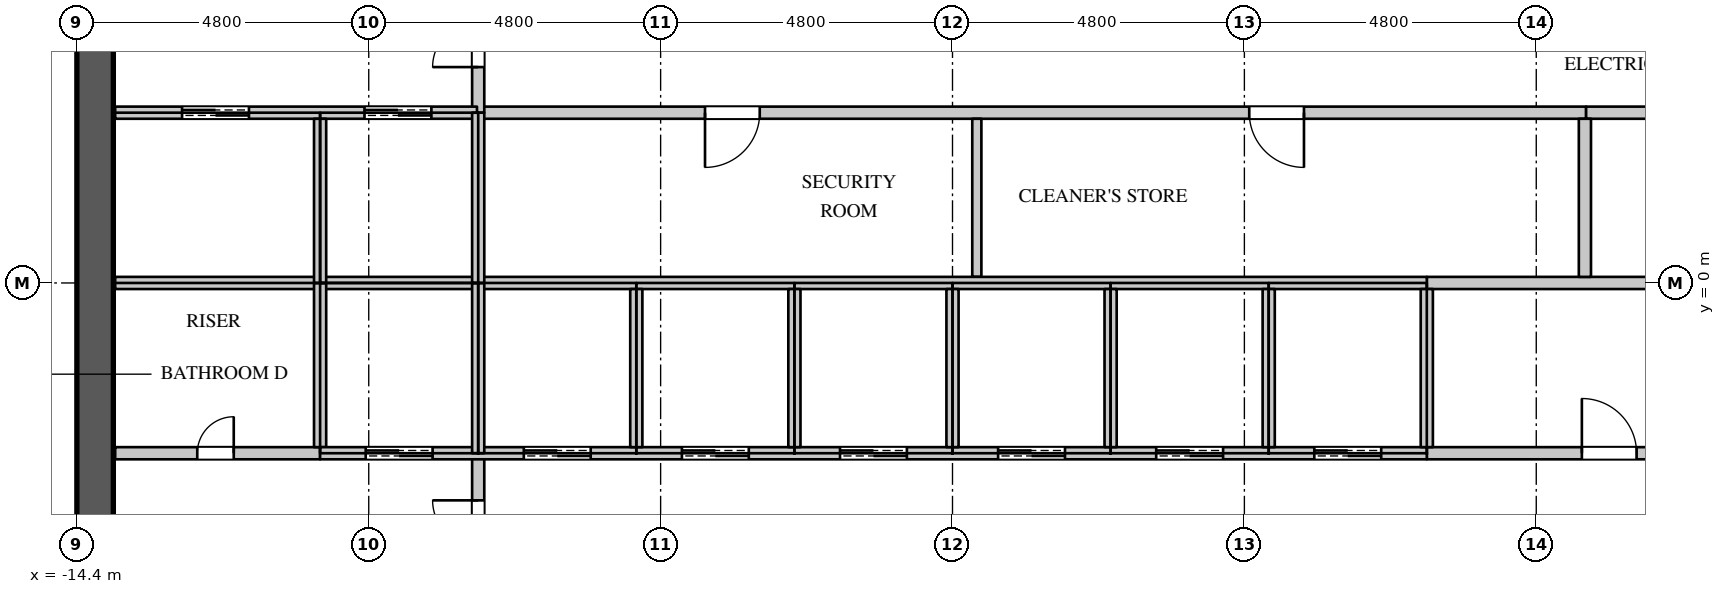
"""IFC4 building model, lengths in metres.
Left out: names, types, materials, properties, quantities, classifications, styles, units other than length and angle.
Written with IfcOpenShell. Run it as: python <this file> out.ifc"""

import sys

from ifc_helpers import new_model, si_unit, direction, frame, frame_2d, origin, place, context, subcontext, project, spatial, rectangle, extrude, element, fill, save


model = new_model("IFC4")
c1 = context("Model", 3, precision=1e-05, world=origin(), true_north=direction((0.0, 1.0)))
c2 = subcontext(c1, "Body", "Model", "MODEL_VIEW")
j1 = project(units=[si_unit("LENGTHUNIT", "METRE"), si_unit("PLANEANGLEUNIT", "RADIAN")], contexts=[c1])
p1 = place(None, origin())
s1 = spatial("IfcSite", under=j1, at=p1, CompositionType="ELEMENT")
p2 = place(p1, origin())
s2 = spatial("IfcBuilding", under=s1, at=p2, CompositionType="ELEMENT")
p3 = place(p2, frame((0.0, 0.0, 281.1)))
s3 = spatial("IfcBuildingStorey", under=s2, at=p3, CompositionType="ELEMENT", Elevation=281.1)
p4 = place(p3, frame((-14.1, -11.4, 0.0), z_axis=(0.0, 0.0, 1.0), x_axis=(0.0, 1.0, 0.0)))
e1 = element("IfcWall", 1, at=p4, inside=s3, PredefinedType="SHEAR", context=c2, shape_type="SweptSolid", body=[
    extrude(rectangle(XDim=22.8, YDim=0.6, at=frame_2d((11.4, 0.0))), origin(), (0.0, 0.0, 1.0), 4.2),
])
p5 = place(p4, frame((20.45, 0.0, 0.0)))
e2 = element("IfcOpeningElement", 2, at=p5, cuts=e1, PredefinedType="OPENING", context=c2, shape_type="SweptSolid", body=[
    extrude(rectangle(XDim=1.1, YDim=2.2, at=frame_2d((0.55, 1.1))), frame((0.0, 0.31, 0.0), z_axis=(0.0, -1.0, 0.0), x_axis=(1.0, 0.0, 0.0)), (0.0, 0.0, 1.0), 0.62),
])
p6 = place(p4, frame((1.25, 0.0, 0.0)))
e3 = element("IfcOpeningElement", 3, at=p6, cuts=e1, PredefinedType="OPENING", context=c2, shape_type="SweptSolid", body=[
    extrude(rectangle(XDim=1.1, YDim=2.2, at=frame_2d((0.55, 1.1))), frame((0.0, 0.31, 0.0), z_axis=(0.0, -1.0, 0.0), x_axis=(1.0, 0.0, 0.0)), (0.0, 0.0, 1.0), 0.62),
])
p7 = place(p4, frame((16.15, 0.0, 0.0)))
e4 = element("IfcOpeningElement", 4, at=p7, cuts=e1, PredefinedType="OPENING", context=c2, shape_type="SweptSolid", body=[
    extrude(rectangle(XDim=1.5, YDim=2.4, at=frame_2d((0.75, 1.2))), frame((0.0, 0.31, 0.0), z_axis=(0.0, -1.0, 0.0), x_axis=(1.0, 0.0, 0.0)), (0.0, 0.0, 1.0), 0.62),
])
p8 = place(p4, frame((5.15, 0.0, 0.0)))
e5 = element("IfcOpeningElement", 5, at=p8, cuts=e1, PredefinedType="OPENING", context=c2, shape_type="SweptSolid", body=[
    extrude(rectangle(XDim=1.5, YDim=2.4, at=frame_2d((0.75, 1.2))), frame((0.0, 0.31, 0.0), z_axis=(0.0, -1.0, 0.0), x_axis=(1.0, 0.0, 0.0)), (0.0, 0.0, 1.0), 0.62),
])
p9 = place(p3, frame((-7.82, 2.8, 0.0), z_axis=(0.0, 0.0, 1.0), x_axis=(1.0, 0.0, 0.0)))
e6 = element("IfcWall", 6, at=p9, inside=s3, PredefinedType="PARTITIONING", context=c2, shape_type="SweptSolid", body=[
    extrude(rectangle(XDim=18.24, YDim=0.2, at=frame_2d((9.12, 0.0))), origin(), (0.0, 0.0, 1.0), 3.95),
])
p10 = place(p9, frame((3.75, 0.0, 0.0)))
e7 = element("IfcOpeningElement", 7, at=p10, cuts=e6, PredefinedType="OPENING", context=c2, shape_type="SweptSolid", body=[
    extrude(rectangle(XDim=0.9, YDim=2.2, at=frame_2d((0.45, 1.1))), frame((0.0, 0.11, 0.0), z_axis=(0.0, -1.0, 0.0), x_axis=(1.0, 0.0, 0.0)), (0.0, 0.0, 1.0), 0.22),
])
p11 = place(p9, frame((12.7, 0.0, 0.0)))
e8 = element("IfcOpeningElement", 8, at=p11, cuts=e6, PredefinedType="OPENING", context=c2, shape_type="SweptSolid", body=[
    extrude(rectangle(XDim=0.9, YDim=2.2, at=frame_2d((0.45, 1.1))), frame((0.0, 0.11, 0.0), z_axis=(0.0, -1.0, 0.0), x_axis=(1.0, 0.0, 0.0)), (0.0, 0.0, 1.0), 0.22),
])
p12 = place(p3, frame((-7.8, -8.075, 0.0), z_axis=(0.0, 0.0, 1.0), x_axis=(0.0, 1.0, 0.0)))
e9 = element("IfcWall", 9, at=p12, inside=s3, PredefinedType="PARTITIONING", context=c2, shape_type="SweptSolid", body=[
    extrude(rectangle(XDim=5.275, YDim=0.2, at=frame_2d((2.637, 0.0))), origin(), (0.0, 0.0, 1.0), 3.95),
])
p13 = place(p12, frame((3.0, 0.0, 0.0)))
e10 = element("IfcOpeningElement", 10, at=p13, cuts=e9, PredefinedType="OPENING", context=c2, shape_type="SweptSolid", body=[
    extrude(rectangle(XDim=1.5, YDim=2.4, at=frame_2d((0.75, 1.2))), frame((0.0, 0.11, 0.0), z_axis=(0.0, -1.0, 0.0), x_axis=(1.0, 0.0, 0.0)), (0.0, 0.0, 1.0), 0.22),
])
p14 = place(p3, frame((-7.8, 2.8, 0.0), z_axis=(0.0, 0.0, 1.0), x_axis=(0.0, 1.0, 0.0)))
e11 = element("IfcWall", 11, at=p14, inside=s3, PredefinedType="PARTITIONING", context=c2, shape_type="SweptSolid", body=[
    extrude(rectangle(XDim=3.0, YDim=0.2, at=frame_2d((1.5, 0.0))), origin(), (0.0, 0.0, 1.0), 3.95),
])
p15 = place(p14, frame((0.75, 0.0, 0.0)))
e12 = element("IfcOpeningElement", 12, at=p15, cuts=e11, PredefinedType="OPENING", context=c2, shape_type="SweptSolid", body=[
    extrude(rectangle(XDim=1.5, YDim=2.4, at=frame_2d((0.75, 1.2))), frame((0.0, 0.11, 0.0), z_axis=(0.0, -1.0, 0.0), x_axis=(1.0, 0.0, 0.0)), (0.0, 0.0, 1.0), 0.22),
])
p16 = place(p3, frame((0.4, 0.1, 0.0), z_axis=(0.0, 0.0, 1.0), x_axis=(0.0, 1.0, 0.0)))
e13 = element("IfcWall", 13, at=p16, inside=s3, PredefinedType="PARTITIONING", context=c2, shape_type="SweptSolid", body=[
    extrude(rectangle(XDim=2.6, YDim=0.15, at=frame_2d((1.3, 0.0))), origin(), (0.0, 0.0, 1.0), 3.95),
])
p17 = place(p3, frame((-13.77, -2.8, 0.0), z_axis=(0.0, 0.0, 1.0), x_axis=(1.0, 0.0, 0.0)))
e14 = element("IfcWall", 14, at=p17, inside=s3, PredefinedType="PARTITIONING", context=c2, shape_type="SweptSolid", body=[
    extrude(rectangle(XDim=3.37, YDim=0.2, at=frame_2d((1.685, 0.0))), origin(), (0.0, 0.0, 1.0), 3.95),
])
p18 = place(p17, frame((1.35, 0.0, 0.0)))
e15 = element("IfcOpeningElement", 15, at=p18, cuts=e14, PredefinedType="OPENING", context=c2, shape_type="SweptSolid", body=[
    extrude(rectangle(XDim=0.6, YDim=2.0, at=frame_2d((0.3, 1.0))), frame((0.0, 0.11, 0.0), z_axis=(0.0, -1.0, 0.0), x_axis=(1.0, 0.0, 0.0)), (0.0, 0.0, 1.0), 0.22),
])
p19 = place(p3, frame((7.8, -2.8, 0.0), z_axis=(0.0, 0.0, 1.0), x_axis=(1.0, 0.0, 0.0)))
e16 = element("IfcWall", 16, at=p19, inside=s3, PredefinedType="PARTITIONING", context=c2, shape_type="SweptSolid", body=[
    extrude(rectangle(XDim=5.97, YDim=0.2, at=frame_2d((2.985, 0.0))), origin(), (0.0, 0.0, 1.0), 3.95),
])
p20 = place(p19, frame((2.55, 0.0, 0.0)))
e17 = element("IfcOpeningElement", 17, at=p20, cuts=e16, PredefinedType="OPENING", context=c2, shape_type="SweptSolid", body=[
    extrude(rectangle(XDim=0.9, YDim=2.2, at=frame_2d((0.45, 1.1))), frame((0.0, 0.11, 0.0), z_axis=(0.0, -1.0, 0.0), x_axis=(1.0, 0.0, 0.0)), (0.0, 0.0, 1.0), 0.22),
])
p21 = place(p3, frame((7.8, 0.0, 0.0), z_axis=(0.0, 0.0, 1.0), x_axis=(1.0, 0.0, 0.0)))
e18 = element("IfcWall", 18, at=p21, inside=s3, PredefinedType="PARTITIONING", context=c2, shape_type="SweptSolid", body=[
    extrude(rectangle(XDim=5.97, YDim=0.2, at=frame_2d((2.985, 0.0))), origin(), (0.0, 0.0, 1.0), 3.95),
])
p22 = place(p3, frame((10.42, 2.8, 0.0), z_axis=(0.0, 0.0, 1.0), x_axis=(1.0, 0.0, 0.0)))
e19 = element("IfcWall", 19, at=p22, inside=s3, PredefinedType="PARTITIONING", context=c2, shape_type="SweptSolid", body=[
    extrude(rectangle(XDim=3.35, YDim=0.2, at=frame_2d((1.675, 0.0))), origin(), (0.0, 0.0, 1.0), 3.95),
])
p23 = place(p22, frame((1.35, 0.0, 0.0)))
e20 = element("IfcOpeningElement", 20, at=p23, cuts=e19, PredefinedType="OPENING", context=c2, shape_type="SweptSolid", body=[
    extrude(rectangle(XDim=0.6, YDim=2.0, at=frame_2d((0.3, 1.0))), frame((0.0, 0.11, 0.0), z_axis=(0.0, -1.0, 0.0), x_axis=(1.0, 0.0, 0.0)), (0.0, 0.0, 1.0), 0.22),
])
p24 = place(p3, frame((10.4, 0.1, 0.0), z_axis=(0.0, 0.0, 1.0), x_axis=(0.0, 1.0, 0.0)))
e21 = element("IfcWall", 21, at=p24, inside=s3, PredefinedType="PARTITIONING", context=c2, shape_type="SweptSolid", body=[
    extrude(rectangle(XDim=2.6, YDim=0.2, at=frame_2d((1.3, 0.0))), origin(), (0.0, 0.0, 1.0), 3.95),
])
p25 = place(p3, frame((-13.77, 0.0, 0.0), z_axis=(0.0, 0.0, 1.0), x_axis=(1.0, 0.0, 0.0)))
e22 = element("IfcWall", 22, at=p25, inside=s3, PredefinedType="PARTITIONING", context=c2, shape_type="SweptSolid", body=[
    extrude(rectangle(XDim=21.57, YDim=0.2, at=frame_2d((10.785, 0.0))), origin(), (0.0, 0.0, 1.0), 3.95),
])
p26 = place(p3, frame((-13.77, 2.8, 0.0), z_axis=(0.0, 0.0, 1.0), x_axis=(1.0, 0.0, 0.0)))
e23 = element("IfcWall", 23, at=p26, inside=s3, PredefinedType="PARTITIONING", context=c2, shape_type="SweptSolid", body=[
    extrude(rectangle(XDim=5.95, YDim=0.2, at=frame_2d((2.975, 0.0))), origin(), (0.0, 0.0, 1.0), 3.95),
])
p27 = place(p26, frame((1.1, 0.0, 0.0)))
e24 = element("IfcOpeningElement", 24, at=p27, cuts=e23, PredefinedType="OPENING", context=c2, shape_type="SweptSolid", body=[
    extrude(rectangle(XDim=1.1, YDim=2.2, at=frame_2d((0.55, 1.1))), frame((0.0, 0.11, 0.0), z_axis=(0.0, -1.0, 0.0), x_axis=(1.0, 0.0, 0.0)), (0.0, 0.0, 1.0), 0.22),
])
p28 = place(p26, frame((4.1, 0.0, 0.0)))
e25 = element("IfcOpeningElement", 25, at=p28, cuts=e23, PredefinedType="OPENING", context=c2, shape_type="SweptSolid", body=[
    extrude(rectangle(XDim=1.1, YDim=2.2, at=frame_2d((0.55, 1.1))), frame((0.0, 0.11, 0.0), z_axis=(0.0, -1.0, 0.0), x_axis=(1.0, 0.0, 0.0)), (0.0, 0.0, 1.0), 0.22),
])
p29 = place(p3, frame((-10.4, -2.7, 0.0), z_axis=(0.0, 0.0, 1.0), x_axis=(0.0, 1.0, 0.0)))
e26 = element("IfcWall", 26, at=p29, inside=s3, PredefinedType="PARTITIONING", context=c2, shape_type="SweptSolid", body=[
    extrude(rectangle(XDim=2.7, YDim=0.2, at=frame_2d((1.35, 0.0))), origin(), (0.0, 0.0, 1.0), 3.95),
])
p30 = place(p3, frame((-10.4, -2.8, 0.0), z_axis=(0.0, 0.0, 1.0), x_axis=(1.0, 0.0, 0.0)))
e27 = element("IfcWall", 27, at=p30, inside=s3, PredefinedType="PARTITIONING", context=c2, shape_type="SweptSolid", body=[
    extrude(rectangle(XDim=18.2, YDim=0.2, at=frame_2d((9.1, 0.0))), origin(), (0.0, 0.0, 1.0), 3.95),
])
p31 = place(p30, frame((0.75, 0.0, 0.0)))
e28 = element("IfcOpeningElement", 28, at=p31, cuts=e27, PredefinedType="OPENING", context=c2, shape_type="SweptSolid", body=[
    extrude(rectangle(XDim=1.1, YDim=2.2, at=frame_2d((0.55, 1.1))), frame((0.0, 0.11, 0.0), z_axis=(0.0, -1.0, 0.0), x_axis=(1.0, 0.0, 0.0)), (0.0, 0.0, 1.0), 0.22),
])
p32 = place(p30, frame((3.35, 0.0, 0.0)))
e29 = element("IfcOpeningElement", 29, at=p32, cuts=e27, PredefinedType="OPENING", context=c2, shape_type="SweptSolid", body=[
    extrude(rectangle(XDim=1.1, YDim=2.2, at=frame_2d((0.55, 1.1))), frame((0.0, 0.11, 0.0), z_axis=(0.0, -1.0, 0.0), x_axis=(1.0, 0.0, 0.0)), (0.0, 0.0, 1.0), 0.22),
])
p33 = place(p30, frame((5.95, 0.0, 0.0)))
e30 = element("IfcOpeningElement", 30, at=p33, cuts=e27, PredefinedType="OPENING", context=c2, shape_type="SweptSolid", body=[
    extrude(rectangle(XDim=1.1, YDim=2.2, at=frame_2d((0.55, 1.1))), frame((0.0, 0.11, 0.0), z_axis=(0.0, -1.0, 0.0), x_axis=(1.0, 0.0, 0.0)), (0.0, 0.0, 1.0), 0.22),
])
p34 = place(p30, frame((8.55, 0.0, 0.0)))
e31 = element("IfcOpeningElement", 31, at=p34, cuts=e27, PredefinedType="OPENING", context=c2, shape_type="SweptSolid", body=[
    extrude(rectangle(XDim=1.1, YDim=2.2, at=frame_2d((0.55, 1.1))), frame((0.0, 0.11, 0.0), z_axis=(0.0, -1.0, 0.0), x_axis=(1.0, 0.0, 0.0)), (0.0, 0.0, 1.0), 0.22),
])
p35 = place(p30, frame((11.15, 0.0, 0.0)))
e32 = element("IfcOpeningElement", 32, at=p35, cuts=e27, PredefinedType="OPENING", context=c2, shape_type="SweptSolid", body=[
    extrude(rectangle(XDim=1.1, YDim=2.2, at=frame_2d((0.55, 1.1))), frame((0.0, 0.11, 0.0), z_axis=(0.0, -1.0, 0.0), x_axis=(1.0, 0.0, 0.0)), (0.0, 0.0, 1.0), 0.22),
])
p36 = place(p30, frame((13.75, 0.0, 0.0)))
e33 = element("IfcOpeningElement", 33, at=p36, cuts=e27, PredefinedType="OPENING", context=c2, shape_type="SweptSolid", body=[
    extrude(rectangle(XDim=1.1, YDim=2.2, at=frame_2d((0.55, 1.1))), frame((0.0, 0.11, 0.0), z_axis=(0.0, -1.0, 0.0), x_axis=(1.0, 0.0, 0.0)), (0.0, 0.0, 1.0), 0.22),
])
p37 = place(p30, frame((16.35, 0.0, 0.0)))
e34 = element("IfcOpeningElement", 34, at=p37, cuts=e27, PredefinedType="OPENING", context=c2, shape_type="SweptSolid", body=[
    extrude(rectangle(XDim=1.1, YDim=2.2, at=frame_2d((0.55, 1.1))), frame((0.0, 0.11, 0.0), z_axis=(0.0, -1.0, 0.0), x_axis=(1.0, 0.0, 0.0)), (0.0, 0.0, 1.0), 0.22),
])
p38 = place(p3, frame((-10.4, 0.0, 0.0), z_axis=(0.0, 0.0, 1.0), x_axis=(0.0, 1.0, 0.0)))
e35 = element("IfcWall", 35, at=p38, inside=s3, PredefinedType="PARTITIONING", context=c2, shape_type="SweptSolid", body=[
    extrude(rectangle(XDim=2.7, YDim=0.2, at=frame_2d((1.35, 0.0))), origin(), (0.0, 0.0, 1.0), 3.95),
])
for number, where, z_axis, x_axis in (
    (36, (-7.8, -2.8, 0.0), (0.0, 0.0, 1.0), (0.0, 1.0, 0.0)),
    (37, (-7.8, 0.0, 0.0), (0.0, 0.0, 1.0), (0.0, 1.0, 0.0)),
):
    element("IfcWall", number, at=place(p3, frame(where, z_axis=z_axis, x_axis=x_axis)), inside=s3, PredefinedType="PARTITIONING", context=c2, shape_type="SweptSolid", body=[
        extrude(rectangle(XDim=2.8, YDim=0.2, at=frame_2d((1.4, 0.0))), origin(), (0.0, 0.0, 1.0), 3.95),
    ])
for number, where, z_axis, x_axis in (
    (38, (-5.2, -2.7, 0.0), (0.0, 0.0, 1.0), (0.0, 1.0, 0.0)),
    (39, (-2.6, -2.7, 0.0), (0.0, 0.0, 1.0), (0.0, 1.0, 0.0)),
    (40, (0.0, -2.7, 0.0), (0.0, 0.0, 1.0), (0.0, 1.0, 0.0)),
    (41, (2.6, -2.7, 0.0), (0.0, 0.0, 1.0), (0.0, 1.0, 0.0)),
    (42, (5.2, -2.7, 0.0), (0.0, 0.0, 1.0), (0.0, 1.0, 0.0)),
    (43, (7.8, -2.7, 0.0), (0.0, 0.0, 1.0), (0.0, 1.0, 0.0)),
):
    element("IfcWall", number, at=place(p3, frame(where, z_axis=z_axis, x_axis=x_axis)), inside=s3, PredefinedType="PARTITIONING", context=c2, shape_type="SweptSolid", body=[
        extrude(rectangle(XDim=2.6, YDim=0.2, at=frame_2d((1.3, 0.0))), origin(), (0.0, 0.0, 1.0), 3.95),
    ])
p39 = place(p18, origin())
e44 = element("IfcDoor", 44, at=p39, inside=s3, OperationType="SINGLE_SWING_RIGHT", PredefinedType="DOOR", context=c2, shape_type="SweptSolid", body=[
    extrude(rectangle(XDim=0.6, YDim=2.0, at=frame_2d((0.3, 1.0))), frame((0.0, 0.025, 0.0), z_axis=(0.0, -1.0, 0.0), x_axis=(1.0, 0.0, 0.0)), (0.0, 0.0, 1.0), 0.05),
])
fill(e15, e44)
p40 = place(p20, origin())
e45 = element("IfcDoor", 45, at=p40, inside=s3, OperationType="SINGLE_SWING_LEFT", PredefinedType="DOOR", context=c2, shape_type="SweptSolid", body=[
    extrude(rectangle(XDim=0.9, YDim=2.2, at=frame_2d((0.45, 1.1))), frame((0.0, 0.025, 0.0), z_axis=(0.0, -1.0, 0.0), x_axis=(1.0, 0.0, 0.0)), (0.0, 0.0, 1.0), 0.05),
])
fill(e17, e45)
p41 = place(p10, origin())
e46 = element("IfcDoor", 46, at=p41, inside=s3, OperationType="SINGLE_SWING_RIGHT", PredefinedType="DOOR", context=c2, shape_type="SweptSolid", body=[
    extrude(rectangle(XDim=0.9, YDim=2.2, at=frame_2d((0.45, 1.1))), frame((0.0, 0.025, 0.0), z_axis=(0.0, -1.0, 0.0), x_axis=(1.0, 0.0, 0.0)), (0.0, 0.0, 1.0), 0.05),
])
fill(e7, e46)
p42 = place(p11, origin())
e47 = element("IfcDoor", 47, at=p42, inside=s3, OperationType="SINGLE_SWING_LEFT", PredefinedType="DOOR", context=c2, shape_type="SweptSolid", body=[
    extrude(rectangle(XDim=0.9, YDim=2.2, at=frame_2d((0.45, 1.1))), frame((0.0, 0.025, 0.0), z_axis=(0.0, -1.0, 0.0), x_axis=(1.0, 0.0, 0.0)), (0.0, 0.0, 1.0), 0.05),
])
fill(e8, e47)
p43 = place(p27, origin())
e48 = element("IfcDoor", 48, at=p43, inside=s3, OperationType="DOUBLE_DOOR_SLIDING", PredefinedType="DOOR", context=c2, shape_type="SweptSolid", body=[
    extrude(rectangle(XDim=1.1, YDim=2.2, at=frame_2d((0.55, 1.1))), frame((0.0, 0.025, 0.0), z_axis=(0.0, -1.0, 0.0), x_axis=(1.0, 0.0, 0.0)), (0.0, 0.0, 1.0), 0.05),
])
fill(e24, e48)
p44 = place(p28, origin())
e49 = element("IfcDoor", 49, at=p44, inside=s3, OperationType="DOUBLE_DOOR_SLIDING", PredefinedType="DOOR", context=c2, shape_type="SweptSolid", body=[
    extrude(rectangle(XDim=1.1, YDim=2.2, at=frame_2d((0.55, 1.1))), frame((0.0, 0.025, 0.0), z_axis=(0.0, -1.0, 0.0), x_axis=(1.0, 0.0, 0.0)), (0.0, 0.0, 1.0), 0.05),
])
fill(e25, e49)
p45 = place(p31, origin())
e50 = element("IfcDoor", 50, at=p45, inside=s3, OperationType="DOUBLE_DOOR_SLIDING", PredefinedType="DOOR", context=c2, shape_type="SweptSolid", body=[
    extrude(rectangle(XDim=1.1, YDim=2.2, at=frame_2d((0.55, 1.1))), frame((0.0, 0.025, 0.0), z_axis=(0.0, -1.0, 0.0), x_axis=(1.0, 0.0, 0.0)), (0.0, 0.0, 1.0), 0.05),
])
fill(e28, e50)
p46 = place(p32, origin())
e51 = element("IfcDoor", 51, at=p46, inside=s3, OperationType="DOUBLE_DOOR_SLIDING", PredefinedType="DOOR", context=c2, shape_type="SweptSolid", body=[
    extrude(rectangle(XDim=1.1, YDim=2.2, at=frame_2d((0.55, 1.1))), frame((0.0, 0.025, 0.0), z_axis=(0.0, -1.0, 0.0), x_axis=(1.0, 0.0, 0.0)), (0.0, 0.0, 1.0), 0.05),
])
fill(e29, e51)
p47 = place(p33, origin())
e52 = element("IfcDoor", 52, at=p47, inside=s3, OperationType="DOUBLE_DOOR_SLIDING", PredefinedType="DOOR", context=c2, shape_type="SweptSolid", body=[
    extrude(rectangle(XDim=1.1, YDim=2.2, at=frame_2d((0.55, 1.1))), frame((0.0, 0.025, 0.0), z_axis=(0.0, -1.0, 0.0), x_axis=(1.0, 0.0, 0.0)), (0.0, 0.0, 1.0), 0.05),
])
fill(e30, e52)
p48 = place(p34, origin())
e53 = element("IfcDoor", 53, at=p48, inside=s3, OperationType="DOUBLE_DOOR_SLIDING", PredefinedType="DOOR", context=c2, shape_type="SweptSolid", body=[
    extrude(rectangle(XDim=1.1, YDim=2.2, at=frame_2d((0.55, 1.1))), frame((0.0, 0.025, 0.0), z_axis=(0.0, -1.0, 0.0), x_axis=(1.0, 0.0, 0.0)), (0.0, 0.0, 1.0), 0.05),
])
fill(e31, e53)
p49 = place(p35, origin())
e54 = element("IfcDoor", 54, at=p49, inside=s3, OperationType="DOUBLE_DOOR_SLIDING", PredefinedType="DOOR", context=c2, shape_type="SweptSolid", body=[
    extrude(rectangle(XDim=1.1, YDim=2.2, at=frame_2d((0.55, 1.1))), frame((0.0, 0.025, 0.0), z_axis=(0.0, -1.0, 0.0), x_axis=(1.0, 0.0, 0.0)), (0.0, 0.0, 1.0), 0.05),
])
fill(e32, e54)
p50 = place(p36, origin())
e55 = element("IfcDoor", 55, at=p50, inside=s3, OperationType="DOUBLE_DOOR_SLIDING", PredefinedType="DOOR", context=c2, shape_type="SweptSolid", body=[
    extrude(rectangle(XDim=1.1, YDim=2.2, at=frame_2d((0.55, 1.1))), frame((0.0, 0.025, 0.0), z_axis=(0.0, -1.0, 0.0), x_axis=(1.0, 0.0, 0.0)), (0.0, 0.0, 1.0), 0.05),
])
fill(e33, e55)
p51 = place(p37, origin())
e56 = element("IfcDoor", 56, at=p51, inside=s3, OperationType="DOUBLE_DOOR_SLIDING", PredefinedType="DOOR", context=c2, shape_type="SweptSolid", body=[
    extrude(rectangle(XDim=1.1, YDim=2.2, at=frame_2d((0.55, 1.1))), frame((0.0, 0.025, 0.0), z_axis=(0.0, -1.0, 0.0), x_axis=(1.0, 0.0, 0.0)), (0.0, 0.0, 1.0), 0.05),
])
fill(e34, e56)
p52 = place(p15, origin())
e57 = element("IfcDoor", 57, at=p52, inside=s3, OperationType="DOUBLE_DOOR_SINGLE_SWING", PredefinedType="DOOR", context=c2, shape_type="SweptSolid", body=[
    extrude(rectangle(XDim=1.5, YDim=2.4, at=frame_2d((0.75, 1.2))), frame((0.0, 0.025, 0.0), z_axis=(0.0, -1.0, 0.0), x_axis=(1.0, 0.0, 0.0)), (0.0, 0.0, 1.0), 0.05),
])
fill(e12, e57)
p53 = place(p13, origin())
e58 = element("IfcDoor", 58, at=p53, inside=s3, OperationType="DOUBLE_DOOR_SINGLE_SWING", PredefinedType="DOOR", context=c2, shape_type="SweptSolid", body=[
    extrude(rectangle(XDim=1.5, YDim=2.4, at=frame_2d((0.75, 1.2))), frame((0.0, 0.025, 0.0), z_axis=(0.0, -1.0, 0.0), x_axis=(1.0, 0.0, 0.0)), (0.0, 0.0, 1.0), 0.05),
])
fill(e10, e58)
save(model, sys.argv[1])
